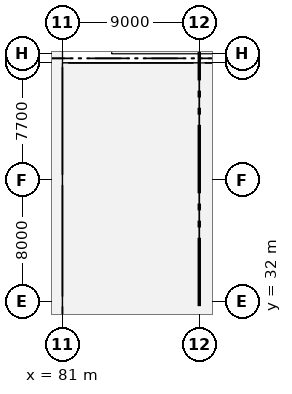
"""IFC4 building model, lengths in metres.
Left out: names, types, materials, properties, quantities, classifications, styles, units other than length and angle.
Written with IfcOpenShell. Run it as: python <this file> out.ifc"""

import sys

from ifc_helpers import new_model, si_unit, direction, frame, frame_2d, origin, origin_2d, place, context, subcontext, project, spatial, rectangle, extrude, element, fill, save


model = new_model("IFC4")
c1 = context("Model", 3, precision=1e-05, world=origin(), true_north=direction((0.0, 1.0)))
c2 = subcontext(c1, "Body", "Model", "MODEL_VIEW")
j1 = project(units=[si_unit("LENGTHUNIT", "METRE"), si_unit("PLANEANGLEUNIT", "RADIAN")], contexts=[c1])
p1 = place(None, origin())
s1 = spatial("IfcSite", under=j1, at=p1, CompositionType="ELEMENT")
p2 = place(p1, origin())
s2 = spatial("IfcBuilding", under=s1, at=p2, CompositionType="ELEMENT")
p3 = place(p2, origin())
s3 = spatial("IfcBuildingStorey", under=s2, at=p3, CompositionType="ELEMENT", Elevation=0.0)
for number, where, z_axis, x_axis in (
    (1, (81.0, 32.0, -0.5), (0.0, 0.0, 1.0), (1.0, 0.0, 0.0)),
    (2, (81.0, 40.0, -0.5), (0.0, 0.0, 1.0), (1.0, 0.0, 0.0)),
):
    element("IfcColumn", number, at=place(p3, frame(where, z_axis=z_axis, x_axis=x_axis)), inside=s3, PredefinedType="COLUMN", context=c2, shape_type="SweptSolid", body=[
        extrude(rectangle(XDim=0.65, YDim=0.65, at=origin_2d()), origin(), (0.0, 0.0, 1.0), 6.8),
    ])
p4 = place(p3, frame((81.0, 47.7, -0.5), z_axis=(0.0, 0.0, 1.0), x_axis=(1.0, 0.0, 0.0)))
e3 = element("IfcColumn", 3, at=p4, inside=s3, PredefinedType="COLUMN", context=c2, shape_type="SweptSolid", body=[
    extrude(rectangle(XDim=0.75, YDim=0.55, at=origin_2d()), origin(), (0.0, 0.0, 1.0), 6.8),
])
p5 = place(p3, frame((81.0, 48.3, -0.5), z_axis=(0.0, 0.0, 1.0), x_axis=(1.0, 0.0, 0.0)))
e4 = element("IfcColumn", 4, at=p5, inside=s3, PredefinedType="COLUMN", context=c2, shape_type="SweptSolid", body=[
    extrude(rectangle(XDim=0.75, YDim=0.55, at=origin_2d()), origin(), (0.0, 0.0, 1.0), 7.3),
])
for number, where, z_axis, x_axis in (
    (5, (90.0, 32.0, -0.5), (0.0, 0.0, 1.0), (1.0, 0.0, 0.0)),
    (6, (90.0, 40.0, -0.5), (0.0, 0.0, 1.0), (1.0, 0.0, 0.0)),
):
    element("IfcColumn", number, at=place(p3, frame(where, z_axis=z_axis, x_axis=x_axis)), inside=s3, PredefinedType="COLUMN", context=c2, shape_type="SweptSolid", body=[
        extrude(rectangle(XDim=0.65, YDim=0.65, at=origin_2d()), origin(), (0.0, 0.0, 1.0), 6.8),
    ])
p6 = place(p3, frame((90.0, 47.7, -0.5), z_axis=(0.0, 0.0, 1.0), x_axis=(1.0, 0.0, 0.0)))
e7 = element("IfcColumn", 7, at=p6, inside=s3, PredefinedType="COLUMN", context=c2, shape_type="SweptSolid", body=[
    extrude(rectangle(XDim=0.75, YDim=0.55, at=origin_2d()), origin(), (0.0, 0.0, 1.0), 6.8),
])
p7 = place(p3, frame((90.0, 48.3, -0.5), z_axis=(0.0, 0.0, 1.0), x_axis=(1.0, 0.0, 0.0)))
e8 = element("IfcColumn", 8, at=p7, inside=s3, PredefinedType="COLUMN", context=c2, shape_type="SweptSolid", body=[
    extrude(rectangle(XDim=0.75, YDim=0.55, at=origin_2d()), origin(), (0.0, 0.0, 1.0), 7.3),
])
p8 = place(p3, frame((81.375, 47.7, 0.0), z_axis=(0.0, 0.0, 1.0), x_axis=(1.0, 0.0, 0.0)))
e9 = element("IfcWall", 9, at=p8, inside=s3, PredefinedType="SOLIDWALL", context=c2, shape_type="SweptSolid", body=[
    extrude(rectangle(XDim=8.25, YDim=0.34, at=frame_2d((4.125, 0.0))), origin(), (0.0, 0.0, 1.0), 5.1),
])
p9 = place(p8, frame((1.85, 0.0, 0.85)))
e10 = element("IfcOpeningElement", 10, at=p9, cuts=e9, PredefinedType="OPENING", context=c2, shape_type="SweptSolid", body=[
    extrude(rectangle(XDim=1.8, YDim=3.15, at=frame_2d((0.9, 1.575))), frame((0.0, 0.18, 0.0), z_axis=(0.0, -1.0, 0.0), x_axis=(1.0, 0.0, 0.0)), (0.0, 0.0, 1.0), 0.36),
])
p10 = place(p8, frame((4.6, 0.0, 0.85)))
e11 = element("IfcOpeningElement", 11, at=p10, cuts=e9, PredefinedType="OPENING", context=c2, shape_type="SweptSolid", body=[
    extrude(rectangle(XDim=1.8, YDim=3.15, at=frame_2d((0.9, 1.575))), frame((0.0, 0.18, 0.0), z_axis=(0.0, -1.0, 0.0), x_axis=(1.0, 0.0, 0.0)), (0.0, 0.0, 1.0), 0.36),
])
p11 = place(p3, frame((90.375, 47.7, 0.0), z_axis=(0.0, 0.0, 1.0), x_axis=(1.0, 0.0, 0.0)))
e12 = element("IfcWall", 12, at=p11, inside=s3, PredefinedType="SOLIDWALL", context=c2, shape_type="SweptSolid", body=[
    extrude(rectangle(XDim=8.25, YDim=0.34, at=frame_2d((4.125, 0.0))), origin(), (0.0, 0.0, 1.0), 5.1),
])
p12 = place(p11, frame((3.125, 0.0, 0.0)))
e13 = element("IfcOpeningElement", 13, at=p12, cuts=e12, PredefinedType="OPENING", context=c2, shape_type="SweptSolid", body=[
    extrude(rectangle(XDim=2.0, YDim=2.75, at=frame_2d((1.0, 1.375))), frame((0.0, 0.18, 0.0), z_axis=(0.0, -1.0, 0.0), x_axis=(1.0, 0.0, 0.0)), (0.0, 0.0, 1.0), 0.36),
])
p13 = place(p3, frame((81.0, 24.325, 0.0), z_axis=(0.0, 0.0, 1.0), x_axis=(0.0, 1.0, 0.0)))
e14 = element("IfcWall", 14, at=p13, inside=s3, PredefinedType="SOLIDWALL", context=c2, shape_type="SweptSolid", body=[
    extrude(rectangle(XDim=7.35, YDim=0.34, at=frame_2d((3.675, 0.0))), origin(), (0.0, 0.0, 1.0), 5.35),
])
p14 = place(p13, frame((4.0, 0.0, 0.85)))
e15 = element("IfcOpeningElement", 15, at=p14, cuts=e14, PredefinedType="OPENING", context=c2, shape_type="SweptSolid", body=[
    extrude(rectangle(XDim=1.8, YDim=3.15, at=frame_2d((0.9, 1.575))), frame((0.0, 0.18, 0.0), z_axis=(0.0, -1.0, 0.0), x_axis=(1.0, 0.0, 0.0)), (0.0, 0.0, 1.0), 0.36),
])
p15 = place(p13, frame((2.1, 0.0, 0.0)))
e16 = element("IfcOpeningElement", 16, at=p15, cuts=e14, PredefinedType="OPENING", context=c2, shape_type="SweptSolid", body=[
    extrude(rectangle(XDim=1.2, YDim=2.25, at=frame_2d((0.6, 1.125))), frame((0.0, 0.18, 0.0), z_axis=(0.0, -1.0, 0.0), x_axis=(1.0, 0.0, 0.0)), (0.0, 0.0, 1.0), 0.36),
])
p16 = place(p3, frame((81.0, 32.325, 0.0), z_axis=(0.0, 0.0, 1.0), x_axis=(0.0, 1.0, 0.0)))
e17 = element("IfcWall", 17, at=p16, inside=s3, PredefinedType="SOLIDWALL", context=c2, shape_type="SweptSolid", body=[
    extrude(rectangle(XDim=7.35, YDim=0.34, at=frame_2d((3.675, 0.0))), origin(), (0.0, 0.0, 1.0), 5.35),
])
p17 = place(p16, frame((1.45, 0.0, 0.85)))
e18 = element("IfcOpeningElement", 18, at=p17, cuts=e17, PredefinedType="OPENING", context=c2, shape_type="SweptSolid", body=[
    extrude(rectangle(XDim=2.0, YDim=3.3, at=frame_2d((1.0, 1.65))), frame((0.0, 0.18, 0.0), z_axis=(0.0, -1.0, 0.0), x_axis=(1.0, 0.0, 0.0)), (0.0, 0.0, 1.0), 0.36),
])
p18 = place(p16, frame((3.9, 0.0, 0.85)))
e19 = element("IfcOpeningElement", 19, at=p18, cuts=e17, PredefinedType="OPENING", context=c2, shape_type="SweptSolid", body=[
    extrude(rectangle(XDim=2.0, YDim=3.3, at=frame_2d((1.0, 1.65))), frame((0.0, 0.18, 0.0), z_axis=(0.0, -1.0, 0.0), x_axis=(1.0, 0.0, 0.0)), (0.0, 0.0, 1.0), 0.36),
])
p19 = place(p3, frame((81.0, 40.325, 0.0), z_axis=(0.0, 0.0, 1.0), x_axis=(0.0, 1.0, 0.0)))
e20 = element("IfcWall", 20, at=p19, inside=s3, PredefinedType="SOLIDWALL", context=c2, shape_type="SweptSolid", body=[
    extrude(rectangle(XDim=7.1, YDim=0.34, at=frame_2d((3.55, 0.0))), origin(), (0.0, 0.0, 1.0), 5.35),
])
p20 = place(p19, frame((1.367, 0.0, 0.85)))
e21 = element("IfcOpeningElement", 21, at=p20, cuts=e20, PredefinedType="OPENING", context=c2, shape_type="SweptSolid", body=[
    extrude(rectangle(XDim=2.0, YDim=3.3, at=frame_2d((1.0, 1.65))), frame((0.0, 0.18, 0.0), z_axis=(0.0, -1.0, 0.0), x_axis=(1.0, 0.0, 0.0)), (0.0, 0.0, 1.0), 0.36),
])
p21 = place(p19, frame((3.733, 0.0, 0.85)))
e22 = element("IfcOpeningElement", 22, at=p21, cuts=e20, PredefinedType="OPENING", context=c2, shape_type="SweptSolid", body=[
    extrude(rectangle(XDim=2.0, YDim=3.3, at=frame_2d((1.0, 1.65))), frame((0.0, 0.18, 0.0), z_axis=(0.0, -1.0, 0.0), x_axis=(1.0, 0.0, 0.0)), (0.0, 0.0, 1.0), 0.36),
])
p22 = place(p3, frame((90.0, 32.3, 0.0), z_axis=(0.0, 0.0, 1.0), x_axis=(0.0, 1.0, 0.0)))
e23 = element("IfcWall", 23, at=p22, inside=s3, PredefinedType="PARTITIONING", context=c2, shape_type="SweptSolid", body=[
    extrude(rectangle(XDim=14.95, YDim=0.11, at=frame_2d((7.475, 0.0))), origin(), (0.0, 0.0, 1.0), 5.35),
])
p23 = place(p22, frame((3.31, 0.0, 0.0)))
e24 = element("IfcOpeningElement", 24, at=p23, cuts=e23, PredefinedType="OPENING", context=c2, shape_type="SweptSolid", body=[
    extrude(rectangle(XDim=1.08, YDim=2.15, at=frame_2d((0.54, 1.075))), frame((0.0, 0.065, 0.0), z_axis=(0.0, -1.0, 0.0), x_axis=(1.0, 0.0, 0.0)), (0.0, 0.0, 1.0), 0.13),
])
p24 = place(p9, origin())
e25 = element("IfcWindow", 25, at=p24, inside=s3, PartitioningType="DOUBLE_PANEL_VERTICAL", PredefinedType="WINDOW", context=c2, shape_type="SweptSolid", body=[
    extrude(rectangle(XDim=1.8, YDim=3.15, at=frame_2d((0.9, 1.575))), frame((0.0, 0.03, 0.0), z_axis=(0.0, -1.0, 0.0), x_axis=(1.0, 0.0, 0.0)), (0.0, 0.0, 1.0), 0.06),
])
fill(e10, e25)
p25 = place(p10, origin())
e26 = element("IfcWindow", 26, at=p25, inside=s3, PartitioningType="DOUBLE_PANEL_VERTICAL", PredefinedType="WINDOW", context=c2, shape_type="SweptSolid", body=[
    extrude(rectangle(XDim=1.8, YDim=3.15, at=frame_2d((0.9, 1.575))), frame((0.0, 0.03, 0.0), z_axis=(0.0, -1.0, 0.0), x_axis=(1.0, 0.0, 0.0)), (0.0, 0.0, 1.0), 0.06),
])
fill(e11, e26)
p26 = place(p17, origin())
e27 = element("IfcWindow", 27, at=p26, inside=s3, PartitioningType="DOUBLE_PANEL_VERTICAL", PredefinedType="WINDOW", context=c2, shape_type="SweptSolid", body=[
    extrude(rectangle(XDim=2.0, YDim=3.3, at=frame_2d((1.0, 1.65))), frame((0.0, 0.03, 0.0), z_axis=(0.0, -1.0, 0.0), x_axis=(1.0, 0.0, 0.0)), (0.0, 0.0, 1.0), 0.06),
])
fill(e18, e27)
p27 = place(p18, origin())
e28 = element("IfcWindow", 28, at=p27, inside=s3, PartitioningType="DOUBLE_PANEL_VERTICAL", PredefinedType="WINDOW", context=c2, shape_type="SweptSolid", body=[
    extrude(rectangle(XDim=2.0, YDim=3.3, at=frame_2d((1.0, 1.65))), frame((0.0, 0.03, 0.0), z_axis=(0.0, -1.0, 0.0), x_axis=(1.0, 0.0, 0.0)), (0.0, 0.0, 1.0), 0.06),
])
fill(e19, e28)
p28 = place(p20, origin())
e29 = element("IfcWindow", 29, at=p28, inside=s3, PartitioningType="DOUBLE_PANEL_VERTICAL", PredefinedType="WINDOW", context=c2, shape_type="SweptSolid", body=[
    extrude(rectangle(XDim=2.0, YDim=3.3, at=frame_2d((1.0, 1.65))), frame((0.0, 0.03, 0.0), z_axis=(0.0, -1.0, 0.0), x_axis=(1.0, 0.0, 0.0)), (0.0, 0.0, 1.0), 0.06),
])
fill(e21, e29)
p29 = place(p21, origin())
e30 = element("IfcWindow", 30, at=p29, inside=s3, PartitioningType="DOUBLE_PANEL_VERTICAL", PredefinedType="WINDOW", context=c2, shape_type="SweptSolid", body=[
    extrude(rectangle(XDim=2.0, YDim=3.3, at=frame_2d((1.0, 1.65))), frame((0.0, 0.03, 0.0), z_axis=(0.0, -1.0, 0.0), x_axis=(1.0, 0.0, 0.0)), (0.0, 0.0, 1.0), 0.06),
])
fill(e22, e30)
p30 = place(p23, origin())
e31 = element("IfcDoor", 31, at=p30, inside=s3, OperationType="SINGLE_SWING_RIGHT", PredefinedType="DOOR", context=c2, shape_type="SweptSolid", body=[
    extrude(rectangle(XDim=1.08, YDim=2.15, at=frame_2d((0.54, 1.075))), frame((0.0, 0.025, 0.0), z_axis=(0.0, -1.0, 0.0), x_axis=(1.0, 0.0, 0.0)), (0.0, 0.0, 1.0), 0.05),
])
fill(e24, e31)
save(model, sys.argv[1])
